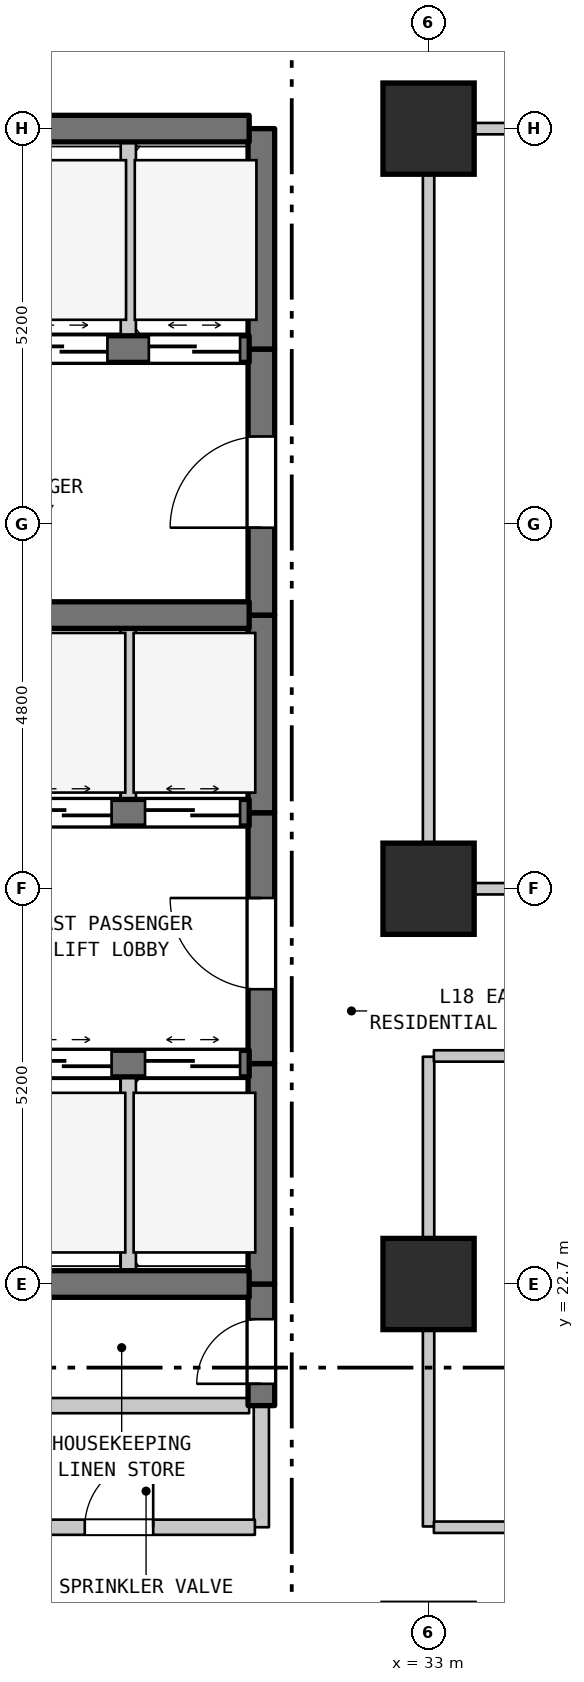
"""IFC4 building model, lengths in metres.
Left out: names, types, materials, properties, quantities, classifications, styles, units other than length and angle.
Written with IfcOpenShell. Run it as: python <this file> out.ifc"""

import sys

from ifc_helpers import new_model, si_unit, direction, frame, frame_2d, origin, origin_2d, place, context, subcontext, project, spatial, rectangle, extrude, element, fill, save


model = new_model("IFC4")
c1 = context("Model", 3, precision=1e-05, world=origin(), true_north=direction((0.0, 1.0)))
c2 = subcontext(c1, "Body", "Model", "MODEL_VIEW")
j1 = project(units=[si_unit("LENGTHUNIT", "METRE"), si_unit("PLANEANGLEUNIT", "RADIAN")], contexts=[c1])
p1 = place(None, origin())
s1 = spatial("IfcSite", under=j1, at=p1, CompositionType="ELEMENT")
p2 = place(p1, origin())
s2 = spatial("IfcBuilding", under=s1, at=p2, CompositionType="ELEMENT")
p3 = place(p2, frame((0.0, 0.0, 77.5)))
s3 = spatial("IfcBuildingStorey", under=s2, at=p3, CompositionType="ELEMENT", Elevation=77.5)
for number, where, z_axis, x_axis in (
    (1, (33.0, 22.7, 0.0), (0.0, 0.0, 1.0), (1.0, 0.0, 0.0)),
    (2, (33.0, 27.9, 0.0), (0.0, 0.0, 1.0), (1.0, 0.0, 0.0)),
    (3, (33.0, 37.9, 0.0), (0.0, 0.0, 1.0), (1.0, 0.0, 0.0)),
):
    element("IfcColumn", number, at=place(p3, frame(where, z_axis=z_axis, x_axis=x_axis)), inside=s3, PredefinedType="COLUMN", context=c2, shape_type="SweptSolid", body=[
        extrude(rectangle(XDim=1.2, YDim=1.2, at=origin_2d()), origin(), (0.0, 0.0, 1.0), 3.7),
    ])
p4 = place(p3, frame((29.05, 22.7, 0.0), z_axis=(0.0, 0.0, 1.0), x_axis=(0.0, 1.0, 0.0)))
e4 = element("IfcWall", 4, at=p4, inside=s3, PredefinedType="STANDARD", context=c2, shape_type="SweptSolid", body=[
    extrude(rectangle(XDim=2.9, YDim=0.2, at=frame_2d((1.45, 0.0))), origin(), (0.0, 0.0, 1.0), 3.28),
])
p5 = place(p3, frame((29.05, 28.9, 0.0), z_axis=(0.0, 0.0, 1.0), x_axis=(0.0, 1.0, 0.0)))
e5 = element("IfcWall", 5, at=p5, inside=s3, PredefinedType="STANDARD", context=c2, shape_type="SweptSolid", body=[
    extrude(rectangle(XDim=2.6, YDim=0.2, at=frame_2d((1.3, 0.0))), origin(), (0.0, 0.0, 1.0), 3.28),
])
p6 = place(p3, frame((29.05, 35.0, 0.0), z_axis=(0.0, 0.0, 1.0), x_axis=(0.0, 1.0, 0.0)))
e6 = element("IfcWall", 6, at=p6, inside=s3, PredefinedType="STANDARD", context=c2, shape_type="SweptSolid", body=[
    extrude(rectangle(XDim=2.9, YDim=0.2, at=frame_2d((1.45, 0.0))), origin(), (0.0, 0.0, 1.0), 3.28),
])
p7 = place(p3, frame((30.8, 19.5, 0.0), z_axis=(0.0, 0.0, 1.0), x_axis=(0.0, 1.0, 0.0)))
e7 = element("IfcWall", 7, at=p7, inside=s3, PredefinedType="STANDARD", context=c2, shape_type="SweptSolid", body=[
    extrude(rectangle(XDim=1.6, YDim=0.2, at=frame_2d((0.8, 0.0))), origin(), (0.0, 0.0, 1.0), 3.28),
])
p8 = place(p3, frame((30.8, 21.1, 0.0), z_axis=(0.0, 0.0, 1.0), x_axis=(0.0, 1.0, 0.0)))
e8 = element("IfcWall", 8, at=p8, inside=s3, PredefinedType="SHEAR", context=c2, shape_type="SweptSolid", body=[
    extrude(rectangle(XDim=1.6, YDim=0.35, at=frame_2d((0.8, 0.0))), origin(), (0.0, 0.0, 1.0), 3.28),
])
p9 = place(p8, frame((0.287, 0.0, 0.0)))
e9 = element("IfcOpeningElement", 9, at=p9, cuts=e8, PredefinedType="OPENING", context=c2, shape_type="SweptSolid", body=[
    extrude(rectangle(XDim=0.85, YDim=2.1, at=frame_2d((0.425, 1.05))), frame((0.0, 0.185, 0.0), z_axis=(0.0, -1.0, 0.0), x_axis=(1.0, 0.0, 0.0)), (0.0, 0.0, 1.0), 0.37),
])
p10 = place(p3, frame((30.8, 22.7, 0.0), z_axis=(0.0, 0.0, 1.0), x_axis=(0.0, 1.0, 0.0)))
e10 = element("IfcWall", 10, at=p10, inside=s3, PredefinedType="SHEAR", context=c2, shape_type="SweptSolid", body=[
    extrude(rectangle(XDim=2.9, YDim=0.35, at=frame_2d((1.45, 0.0))), origin(), (0.0, 0.0, 1.0), 3.28),
])
p11 = place(p3, frame((30.8, 25.6, 0.0), z_axis=(0.0, 0.0, 1.0), x_axis=(0.0, 1.0, 0.0)))
e11 = element("IfcWall", 11, at=p11, inside=s3, PredefinedType="SHEAR", context=c2, shape_type="SweptSolid", body=[
    extrude(rectangle(XDim=3.3, YDim=0.35, at=frame_2d((1.65, 0.0))), origin(), (0.0, 0.0, 1.0), 3.28),
])
p12 = place(p11, frame((0.978, 0.0, 0.0)))
e12 = element("IfcOpeningElement", 12, at=p12, cuts=e11, PredefinedType="OPENING", context=c2, shape_type="SweptSolid", body=[
    extrude(rectangle(XDim=1.2, YDim=2.2, at=frame_2d((0.6, 1.1))), frame((0.0, 0.185, 0.0), z_axis=(0.0, -1.0, 0.0), x_axis=(1.0, 0.0, 0.0)), (0.0, 0.0, 1.0), 0.37),
])
p13 = place(p3, frame((30.8, 28.9, 0.0), z_axis=(0.0, 0.0, 1.0), x_axis=(0.0, 1.0, 0.0)))
e13 = element("IfcWall", 13, at=p13, inside=s3, PredefinedType="SHEAR", context=c2, shape_type="SweptSolid", body=[
    extrude(rectangle(XDim=2.6, YDim=0.35, at=frame_2d((1.3, 0.0))), origin(), (0.0, 0.0, 1.0), 3.28),
])
p14 = place(p3, frame((30.8, 31.5, 0.0), z_axis=(0.0, 0.0, 1.0), x_axis=(0.0, 1.0, 0.0)))
e14 = element("IfcWall", 14, at=p14, inside=s3, PredefinedType="SHEAR", context=c2, shape_type="SweptSolid", body=[
    extrude(rectangle(XDim=3.5, YDim=0.35, at=frame_2d((1.75, 0.0))), origin(), (0.0, 0.0, 1.0), 3.28),
])
p15 = place(p14, frame((1.15, 0.0, 0.0)))
e15 = element("IfcOpeningElement", 15, at=p15, cuts=e14, PredefinedType="OPENING", context=c2, shape_type="SweptSolid", body=[
    extrude(rectangle(XDim=1.2, YDim=2.2, at=frame_2d((0.6, 1.1))), frame((0.0, 0.185, 0.0), z_axis=(0.0, -1.0, 0.0), x_axis=(1.0, 0.0, 0.0)), (0.0, 0.0, 1.0), 0.37),
])
p16 = place(p3, frame((30.8, 35.0, 0.0), z_axis=(0.0, 0.0, 1.0), x_axis=(0.0, 1.0, 0.0)))
e16 = element("IfcWall", 16, at=p16, inside=s3, PredefinedType="SHEAR", context=c2, shape_type="SweptSolid", body=[
    extrude(rectangle(XDim=2.9, YDim=0.35, at=frame_2d((1.45, 0.0))), origin(), (0.0, 0.0, 1.0), 3.28),
])
p17 = place(p3, frame((33.0, 19.51, 0.0), z_axis=(0.0, 0.0, 1.0), x_axis=(0.0, 1.0, 0.0)))
e17 = element("IfcWall", 17, at=p17, inside=s3, PredefinedType="STANDARD", context=c2, shape_type="SweptSolid", body=[
    extrude(rectangle(XDim=6.18, YDim=0.15, at=frame_2d((3.09, 0.0))), origin(), (0.0, 0.0, 1.0), 2.78),
])
p18 = place(p3, frame((33.0, 27.91, 0.0), z_axis=(0.0, 0.0, 1.0), x_axis=(0.0, 1.0, 0.0)))
e18 = element("IfcWall", 18, at=p18, inside=s3, PredefinedType="STANDARD", context=c2, shape_type="SweptSolid", body=[
    extrude(rectangle(XDim=9.98, YDim=0.15, at=frame_2d((4.99, 0.0))), origin(), (0.0, 0.0, 1.0), 2.78),
])
p19 = place(p3, frame((27.285, 19.5, 0.0), z_axis=(0.0, 0.0, 1.0), x_axis=(1.0, 0.0, 0.0)))
e19 = element("IfcWall", 19, at=p19, inside=s3, PredefinedType="STANDARD", context=c2, shape_type="SweptSolid", body=[
    extrude(rectangle(XDim=3.43, YDim=0.2, at=frame_2d((1.715, 0.0))), origin(), (0.0, 0.0, 1.0), 3.28),
])
p20 = place(p19, frame((1.192, 0.0, 0.0)))
e20 = element("IfcOpeningElement", 20, at=p20, cuts=e19, PredefinedType="OPENING", context=c2, shape_type="SweptSolid", body=[
    extrude(rectangle(XDim=0.9, YDim=2.15, at=frame_2d((0.45, 1.075))), frame((0.0, 0.11, 0.0), z_axis=(0.0, -1.0, 0.0), x_axis=(1.0, 0.0, 0.0)), (0.0, 0.0, 1.0), 0.22),
])
p21 = place(p3, frame((33.07, 19.5, 0.0), z_axis=(0.0, 0.0, 1.0), x_axis=(1.0, 0.0, 0.0)))
e21 = element("IfcWall", 21, at=p21, inside=s3, PredefinedType="STANDARD", context=c2, shape_type="SweptSolid", body=[
    extrude(rectangle(XDim=33.27, YDim=0.15, at=frame_2d((16.635, 0.0))), origin(), (0.0, 0.0, 1.0), 3.28),
])
p22 = place(p21, frame((16.065, 0.0, 0.0)))
e22 = element("IfcOpeningElement", 22, at=p22, cuts=e21, PredefinedType="OPENING", context=c2, shape_type="SweptSolid", body=[
    extrude(rectangle(XDim=1.0, YDim=2.15, at=frame_2d((0.5, 1.075))), frame((0.0, 0.085, 0.0), z_axis=(0.0, -1.0, 0.0), x_axis=(1.0, 0.0, 0.0)), (0.0, 0.0, 1.0), 0.17),
])
p23 = place(p3, frame((27.285, 21.1, 0.0), z_axis=(0.0, 0.0, 1.0), x_axis=(1.0, 0.0, 0.0)))
e23 = element("IfcWall", 23, at=p23, inside=s3, PredefinedType="STANDARD", context=c2, shape_type="SweptSolid", body=[
    extrude(rectangle(XDim=3.355, YDim=0.2, at=frame_2d((1.677, 0.0))), origin(), (0.0, 0.0, 1.0), 3.28),
])
p24 = place(p3, frame((27.46, 22.7, 0.0), z_axis=(0.0, 0.0, 1.0), x_axis=(1.0, 0.0, 0.0)))
e24 = element("IfcWall", 24, at=p24, inside=s3, PredefinedType="SHEAR", context=c2, shape_type="SweptSolid", body=[
    extrude(rectangle(XDim=3.18, YDim=0.35, at=frame_2d((1.59, 0.0))), origin(), (0.0, 0.0, 1.0), 3.28),
])
p25 = place(p3, frame((27.46, 25.6, 0.0), z_axis=(0.0, 0.0, 1.0), x_axis=(1.0, 0.0, 0.0)))
e25 = element("IfcWall", 25, at=p25, inside=s3, PredefinedType="SHEAR", context=c2, shape_type="SweptSolid", body=[
    extrude(rectangle(XDim=3.18, YDim=0.35, at=frame_2d((1.59, 0.0))), origin(), (0.0, 0.0, 1.0), 3.28),
])
p26 = place(p25, frame((0.12, 0.0, 0.0)))
e26 = element("IfcOpeningElement", 26, at=p26, cuts=e25, PredefinedType="OPENING", context=c2, shape_type="SweptSolid", body=[
    extrude(rectangle(XDim=1.25, YDim=2.2, at=frame_2d((0.625, 1.1))), frame((0.0, 0.185, 0.0), z_axis=(0.0, -1.0, 0.0), x_axis=(1.0, 0.0, 0.0)), (0.0, 0.0, 1.0), 0.37),
])
p27 = place(p25, frame((1.81, 0.0, 0.0)))
e27 = element("IfcOpeningElement", 27, at=p27, cuts=e25, PredefinedType="OPENING", context=c2, shape_type="SweptSolid", body=[
    extrude(rectangle(XDim=1.25, YDim=2.2, at=frame_2d((0.625, 1.1))), frame((0.0, 0.185, 0.0), z_axis=(0.0, -1.0, 0.0), x_axis=(1.0, 0.0, 0.0)), (0.0, 0.0, 1.0), 0.37),
])
p28 = place(p3, frame((33.07, 25.7, 0.0), z_axis=(0.0, 0.0, 1.0), x_axis=(1.0, 0.0, 0.0)))
e28 = element("IfcWall", 28, at=p28, inside=s3, PredefinedType="STANDARD", context=c2, shape_type="SweptSolid", body=[
    extrude(rectangle(XDim=30.87, YDim=0.15, at=frame_2d((15.435, 0.0))), origin(), (0.0, 0.0, 1.0), 3.28),
])
p29 = place(p3, frame((33.07, 27.9, 0.0), z_axis=(0.0, 0.0, 1.0), x_axis=(1.0, 0.0, 0.0)))
e29 = element("IfcWall", 29, at=p29, inside=s3, PredefinedType="STANDARD", context=c2, shape_type="SweptSolid", body=[
    extrude(rectangle(XDim=30.87, YDim=0.15, at=frame_2d((15.435, 0.0))), origin(), (0.0, 0.0, 1.0), 2.68),
])
p30 = place(p29, frame((14.935, 0.0, 0.0)))
e30 = element("IfcOpeningElement", 30, at=p30, cuts=e29, PredefinedType="OPENING", context=c2, shape_type="SweptSolid", body=[
    extrude(rectangle(XDim=1.0, YDim=2.15, at=frame_2d((0.5, 1.075))), frame((0.0, 0.085, 0.0), z_axis=(0.0, -1.0, 0.0), x_axis=(1.0, 0.0, 0.0)), (0.0, 0.0, 1.0), 0.17),
])
p31 = place(p3, frame((27.46, 28.9, 0.0), z_axis=(0.0, 0.0, 1.0), x_axis=(1.0, 0.0, 0.0)))
e31 = element("IfcWall", 31, at=p31, inside=s3, PredefinedType="SHEAR", context=c2, shape_type="SweptSolid", body=[
    extrude(rectangle(XDim=3.18, YDim=0.35, at=frame_2d((1.59, 0.0))), origin(), (0.0, 0.0, 1.0), 3.28),
])
p32 = place(p31, frame((0.12, 0.0, 0.0)))
e32 = element("IfcOpeningElement", 32, at=p32, cuts=e31, PredefinedType="OPENING", context=c2, shape_type="SweptSolid", body=[
    extrude(rectangle(XDim=1.25, YDim=2.2, at=frame_2d((0.625, 1.1))), frame((0.0, 0.185, 0.0), z_axis=(0.0, -1.0, 0.0), x_axis=(1.0, 0.0, 0.0)), (0.0, 0.0, 1.0), 0.37),
])
p33 = place(p31, frame((1.81, 0.0, 0.0)))
e33 = element("IfcOpeningElement", 33, at=p33, cuts=e31, PredefinedType="OPENING", context=c2, shape_type="SweptSolid", body=[
    extrude(rectangle(XDim=1.25, YDim=2.2, at=frame_2d((0.625, 1.1))), frame((0.0, 0.185, 0.0), z_axis=(0.0, -1.0, 0.0), x_axis=(1.0, 0.0, 0.0)), (0.0, 0.0, 1.0), 0.37),
])
p34 = place(p3, frame((27.46, 31.5, 0.0), z_axis=(0.0, 0.0, 1.0), x_axis=(1.0, 0.0, 0.0)))
e34 = element("IfcWall", 34, at=p34, inside=s3, PredefinedType="SHEAR", context=c2, shape_type="SweptSolid", body=[
    extrude(rectangle(XDim=3.18, YDim=0.35, at=frame_2d((1.59, 0.0))), origin(), (0.0, 0.0, 1.0), 3.28),
])
p35 = place(p3, frame((19.16, 35.0, 0.0), z_axis=(0.0, 0.0, 1.0), x_axis=(1.0, 0.0, 0.0)))
e35 = element("IfcWall", 35, at=p35, inside=s3, PredefinedType="SHEAR", context=c2, shape_type="SweptSolid", body=[
    extrude(rectangle(XDim=11.48, YDim=0.35, at=frame_2d((5.74, 0.0))), origin(), (0.0, 0.0, 1.0), 3.28),
])
p36 = place(p35, frame((0.365, 0.0, 0.0)))
e36 = element("IfcOpeningElement", 36, at=p36, cuts=e35, PredefinedType="OPENING", context=c2, shape_type="SweptSolid", body=[
    extrude(rectangle(XDim=1.35, YDim=2.2, at=frame_2d((0.675, 1.1))), frame((0.0, 0.185, 0.0), z_axis=(0.0, -1.0, 0.0), x_axis=(1.0, 0.0, 0.0)), (0.0, 0.0, 1.0), 0.37),
])
p37 = place(p35, frame((2.765, 0.0, 0.0)))
e37 = element("IfcOpeningElement", 37, at=p37, cuts=e35, PredefinedType="OPENING", context=c2, shape_type="SweptSolid", body=[
    extrude(rectangle(XDim=1.35, YDim=2.2, at=frame_2d((0.675, 1.1))), frame((0.0, 0.185, 0.0), z_axis=(0.0, -1.0, 0.0), x_axis=(1.0, 0.0, 0.0)), (0.0, 0.0, 1.0), 0.37),
])
p38 = place(p35, frame((4.915, 0.0, 0.0)))
e38 = element("IfcOpeningElement", 38, at=p38, cuts=e35, PredefinedType="OPENING", context=c2, shape_type="SweptSolid", body=[
    extrude(rectangle(XDim=1.2, YDim=2.2, at=frame_2d((0.6, 1.1))), frame((0.0, 0.185, 0.0), z_axis=(0.0, -1.0, 0.0), x_axis=(1.0, 0.0, 0.0)), (0.0, 0.0, 1.0), 0.37),
])
p39 = place(p35, frame((6.665, 0.0, 0.0)))
e39 = element("IfcOpeningElement", 39, at=p39, cuts=e35, PredefinedType="OPENING", context=c2, shape_type="SweptSolid", body=[
    extrude(rectangle(XDim=1.2, YDim=2.2, at=frame_2d((0.6, 1.1))), frame((0.0, 0.185, 0.0), z_axis=(0.0, -1.0, 0.0), x_axis=(1.0, 0.0, 0.0)), (0.0, 0.0, 1.0), 0.37),
])
p40 = place(p35, frame((8.415, 0.0, 0.0)))
e40 = element("IfcOpeningElement", 40, at=p40, cuts=e35, PredefinedType="OPENING", context=c2, shape_type="SweptSolid", body=[
    extrude(rectangle(XDim=1.2, YDim=2.2, at=frame_2d((0.6, 1.1))), frame((0.0, 0.185, 0.0), z_axis=(0.0, -1.0, 0.0), x_axis=(1.0, 0.0, 0.0)), (0.0, 0.0, 1.0), 0.37),
])
p41 = place(p35, frame((10.16, 0.0, 0.0)))
e41 = element("IfcOpeningElement", 41, at=p41, cuts=e35, PredefinedType="OPENING", context=c2, shape_type="SweptSolid", body=[
    extrude(rectangle(XDim=1.2, YDim=2.2, at=frame_2d((0.6, 1.1))), frame((0.0, 0.185, 0.0), z_axis=(0.0, -1.0, 0.0), x_axis=(1.0, 0.0, 0.0)), (0.0, 0.0, 1.0), 0.37),
])
p42 = place(p3, frame((19.16, 37.9, 0.0), z_axis=(0.0, 0.0, 1.0), x_axis=(1.0, 0.0, 0.0)))
e42 = element("IfcWall", 42, at=p42, inside=s3, PredefinedType="SHEAR", context=c2, shape_type="SweptSolid", body=[
    extrude(rectangle(XDim=11.48, YDim=0.35, at=frame_2d((5.74, 0.0))), origin(), (0.0, 0.0, 1.0), 3.28),
])
p43 = place(p3, frame((33.07, 37.9, 0.0), z_axis=(0.0, 0.0, 1.0), x_axis=(1.0, 0.0, 0.0)))
e43 = element("IfcWall", 43, at=p43, inside=s3, PredefinedType="STANDARD", context=c2, shape_type="SweptSolid", body=[
    extrude(rectangle(XDim=26.935, YDim=0.15, at=frame_2d((13.467, 0.0))), origin(), (0.0, 0.0, 1.0), 3.28),
])
p44 = place(p9, origin())
e44 = element("IfcDoor", 44, at=p44, inside=s3, OperationType="SINGLE_SWING_LEFT", PredefinedType="DOOR", context=c2, shape_type="SweptSolid", body=[
    extrude(rectangle(XDim=0.85, YDim=2.1, at=frame_2d((0.425, 1.05))), frame((0.0, 0.025, 0.0), z_axis=(0.0, -1.0, 0.0), x_axis=(1.0, 0.0, 0.0)), (0.0, 0.0, 1.0), 0.05),
])
fill(e9, e44)
p45 = place(p12, origin())
e45 = element("IfcDoor", 45, at=p45, inside=s3, OperationType="SINGLE_SWING_RIGHT", PredefinedType="DOOR", context=c2, shape_type="SweptSolid", body=[
    extrude(rectangle(XDim=1.2, YDim=2.2, at=frame_2d((0.6, 1.1))), frame((0.0, 0.025, 0.0), z_axis=(0.0, -1.0, 0.0), x_axis=(1.0, 0.0, 0.0)), (0.0, 0.0, 1.0), 0.05),
])
fill(e12, e45)
p46 = place(p15, origin())
e46 = element("IfcDoor", 46, at=p46, inside=s3, OperationType="SINGLE_SWING_LEFT", PredefinedType="DOOR", context=c2, shape_type="SweptSolid", body=[
    extrude(rectangle(XDim=1.2, YDim=2.2, at=frame_2d((0.6, 1.1))), frame((0.0, 0.025, 0.0), z_axis=(0.0, -1.0, 0.0), x_axis=(1.0, 0.0, 0.0)), (0.0, 0.0, 1.0), 0.05),
])
fill(e15, e46)
p47 = place(p20, origin())
e47 = element("IfcDoor", 47, at=p47, inside=s3, OperationType="SINGLE_SWING_RIGHT", PredefinedType="DOOR", context=c2, shape_type="SweptSolid", body=[
    extrude(rectangle(XDim=0.9, YDim=2.15, at=frame_2d((0.45, 1.075))), frame((0.0, 0.025, 0.0), z_axis=(0.0, -1.0, 0.0), x_axis=(1.0, 0.0, 0.0)), (0.0, 0.0, 1.0), 0.05),
])
fill(e20, e47)
p48 = place(p26, origin())
e48 = element("IfcDoor", 48, at=p48, inside=s3, OperationType="DOUBLE_DOOR_SLIDING", PredefinedType="DOOR", context=c2, shape_type="SweptSolid", body=[
    extrude(rectangle(XDim=1.25, YDim=2.2, at=frame_2d((0.625, 1.1))), frame((0.0, 0.025, 0.0), z_axis=(0.0, -1.0, 0.0), x_axis=(1.0, 0.0, 0.0)), (0.0, 0.0, 1.0), 0.05),
])
fill(e26, e48)
p49 = place(p27, origin())
e49 = element("IfcDoor", 49, at=p49, inside=s3, OperationType="DOUBLE_DOOR_SLIDING", PredefinedType="DOOR", context=c2, shape_type="SweptSolid", body=[
    extrude(rectangle(XDim=1.25, YDim=2.2, at=frame_2d((0.625, 1.1))), frame((0.0, 0.025, 0.0), z_axis=(0.0, -1.0, 0.0), x_axis=(1.0, 0.0, 0.0)), (0.0, 0.0, 1.0), 0.05),
])
fill(e27, e49)
p50 = place(p32, origin())
e50 = element("IfcDoor", 50, at=p50, inside=s3, OperationType="DOUBLE_DOOR_SLIDING", PredefinedType="DOOR", context=c2, shape_type="SweptSolid", body=[
    extrude(rectangle(XDim=1.25, YDim=2.2, at=frame_2d((0.625, 1.1))), frame((0.0, 0.025, 0.0), z_axis=(0.0, -1.0, 0.0), x_axis=(1.0, 0.0, 0.0)), (0.0, 0.0, 1.0), 0.05),
])
fill(e32, e50)
p51 = place(p33, origin())
e51 = element("IfcDoor", 51, at=p51, inside=s3, OperationType="DOUBLE_DOOR_SLIDING", PredefinedType="DOOR", context=c2, shape_type="SweptSolid", body=[
    extrude(rectangle(XDim=1.25, YDim=2.2, at=frame_2d((0.625, 1.1))), frame((0.0, 0.025, 0.0), z_axis=(0.0, -1.0, 0.0), x_axis=(1.0, 0.0, 0.0)), (0.0, 0.0, 1.0), 0.05),
])
fill(e33, e51)
p52 = place(p40, origin())
e52 = element("IfcDoor", 52, at=p52, inside=s3, OperationType="DOUBLE_DOOR_SLIDING", PredefinedType="DOOR", context=c2, shape_type="SweptSolid", body=[
    extrude(rectangle(XDim=1.2, YDim=2.2, at=frame_2d((0.6, 1.1))), frame((0.0, 0.025, 0.0), z_axis=(0.0, -1.0, 0.0), x_axis=(1.0, 0.0, 0.0)), (0.0, 0.0, 1.0), 0.05),
])
fill(e40, e52)
p53 = place(p41, origin())
e53 = element("IfcDoor", 53, at=p53, inside=s3, OperationType="DOUBLE_DOOR_SLIDING", PredefinedType="DOOR", context=c2, shape_type="SweptSolid", body=[
    extrude(rectangle(XDim=1.2, YDim=2.2, at=frame_2d((0.6, 1.1))), frame((0.0, 0.025, 0.0), z_axis=(0.0, -1.0, 0.0), x_axis=(1.0, 0.0, 0.0)), (0.0, 0.0, 1.0), 0.05),
])
fill(e41, e53)
save(model, sys.argv[1])
